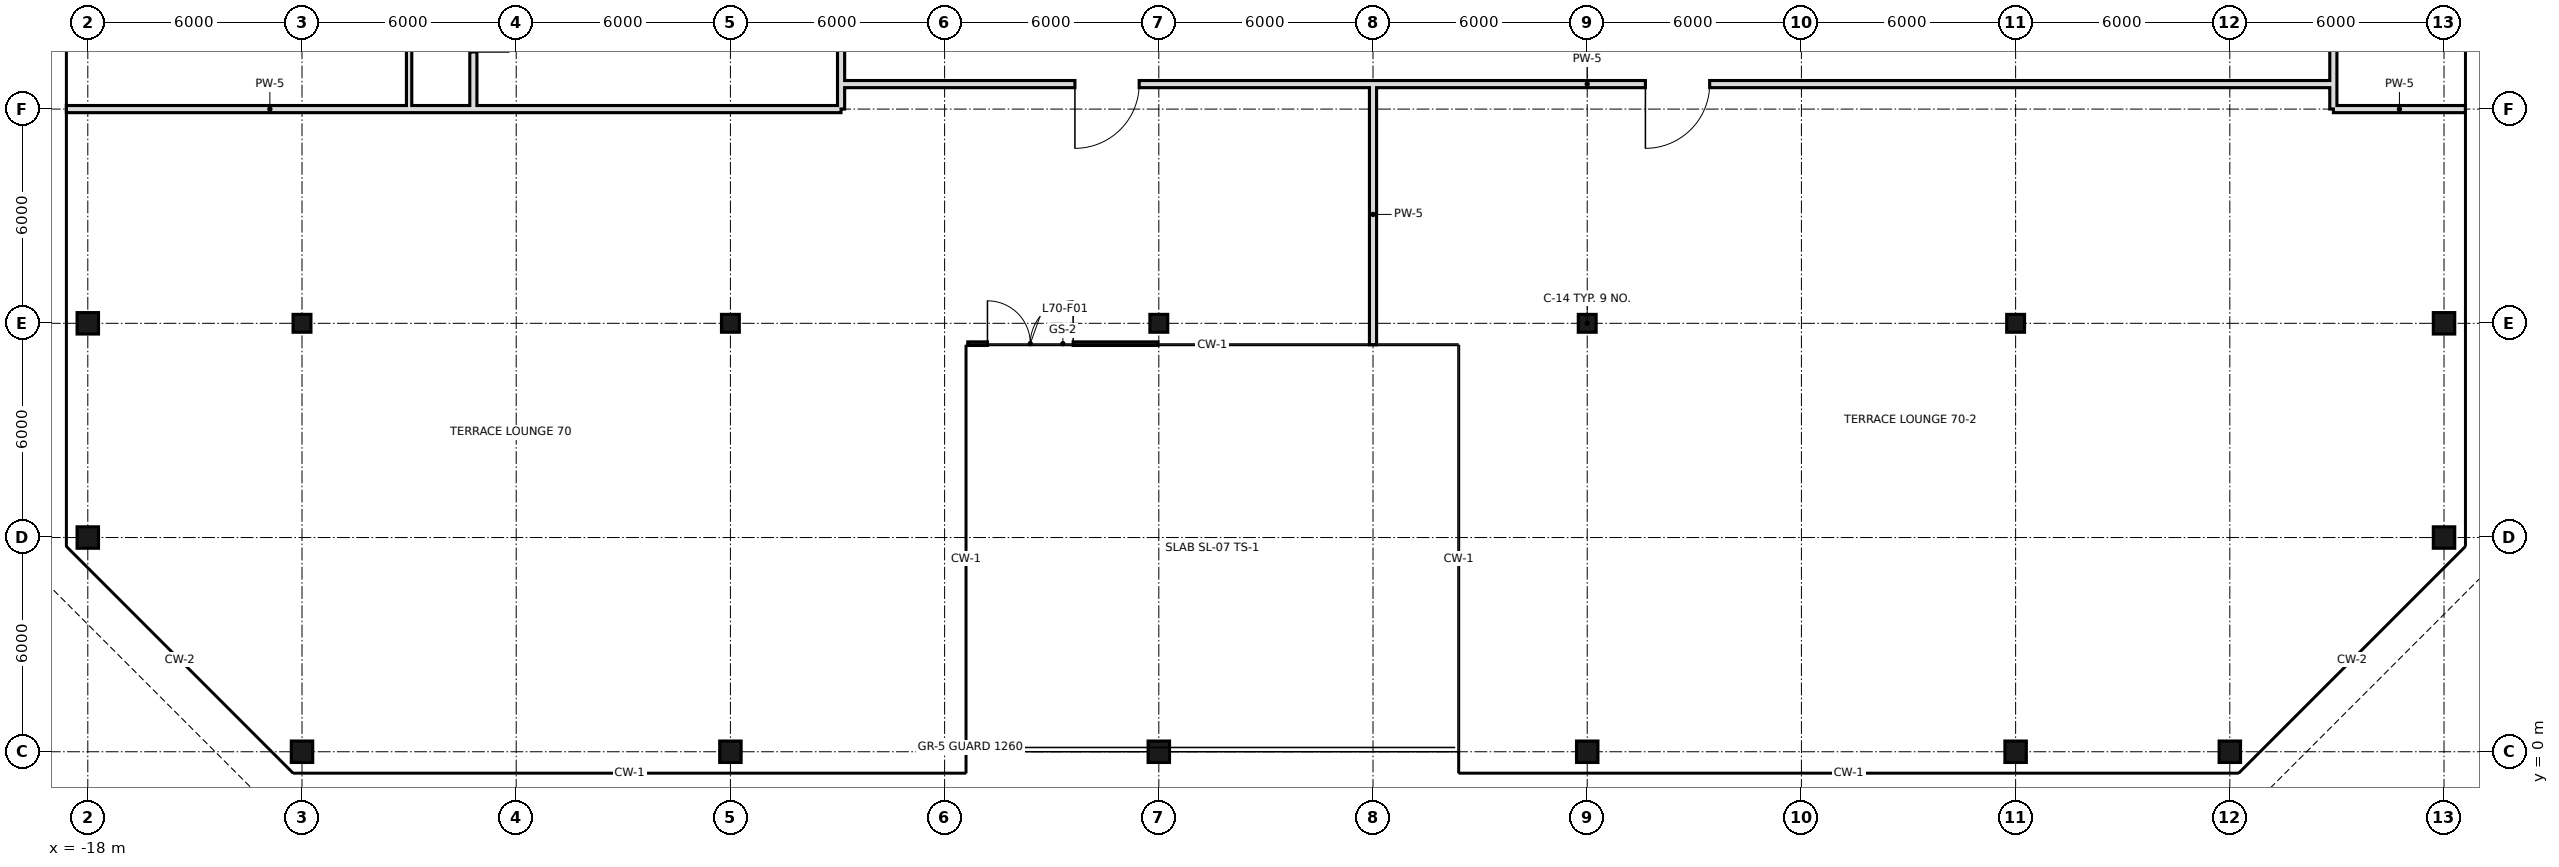
"""IFC4 building model, lengths in metres.
Left out: names, types, materials, properties, quantities, classifications, styles, units other than length and angle.
Written with IfcOpenShell. Run it as: python <this file> out.ifc"""

import sys

from ifc_helpers import new_model, si_unit, direction, frame, frame_2d, origin, origin_with_axes, origin_2d, place, context, subcontext, project, spatial, rectangle, hollow_rectangle, extrude, element, fill, save


model = new_model("IFC4")
c1 = context("Model", 3, precision=1e-05, world=origin(), true_north=direction((0.0, 1.0)))
c2 = subcontext(c1, "Body", "Model", "MODEL_VIEW")
j1 = project(units=[si_unit("LENGTHUNIT", "METRE"), si_unit("PLANEANGLEUNIT", "RADIAN")], contexts=[c1])
p1 = place(None, origin())
s1 = spatial("IfcSite", under=j1, at=p1, CompositionType="ELEMENT")
p2 = place(p1, origin())
s2 = spatial("IfcBuilding", under=s1, at=p2, CompositionType="ELEMENT")
p3 = place(p2, frame((0.0, 0.0, 298.0)))
s3 = spatial("IfcBuildingStorey", under=s2, at=p3, CompositionType="ELEMENT", Elevation=298.0)
for number, where, z_axis, x_axis in (
    (1, (-18.0, 6.0, 0.0), (0.0, 0.0, 1.0), (1.0, 0.0, 0.0)),
    (2, (-18.0, 12.0, 0.0), (0.0, 0.0, 1.0), (1.0, 0.0, 0.0)),
    (3, (-12.0, 0.0, 0.0), (0.0, 0.0, 1.0), (1.0, 0.0, 0.0)),
):
    element("IfcColumn", number, at=place(p3, frame(where, z_axis=z_axis, x_axis=x_axis)), inside=s3, PredefinedType="COLUMN", context=c2, shape_type="SweptSolid", body=[
        extrude(hollow_rectangle(XDim=0.6, YDim=0.6, WallThickness=0.028, at=origin_2d()), origin(), (0.0, 0.0, 1.0), 3.6),
    ])
p4 = place(p3, frame((-12.0, 12.0, 0.0), z_axis=(0.0, 0.0, 1.0), x_axis=(1.0, 0.0, 0.0)))
e4 = element("IfcColumn", 4, at=p4, inside=s3, PredefinedType="COLUMN", context=c2, shape_type="SweptSolid", body=[
    extrude(hollow_rectangle(XDim=0.5, YDim=0.5, WallThickness=0.025, at=origin_2d()), origin(), (0.0, 0.0, 1.0), 3.6),
])
p5 = place(p3, origin_with_axes())
e5 = element("IfcColumn", 5, at=p5, inside=s3, PredefinedType="COLUMN", context=c2, shape_type="SweptSolid", body=[
    extrude(hollow_rectangle(XDim=0.6, YDim=0.6, WallThickness=0.028, at=origin_2d()), origin(), (0.0, 0.0, 1.0), 3.6),
])
p6 = place(p3, frame((0.0, 12.0, 0.0), z_axis=(0.0, 0.0, 1.0), x_axis=(1.0, 0.0, 0.0)))
e6 = element("IfcColumn", 6, at=p6, inside=s3, PredefinedType="COLUMN", context=c2, shape_type="SweptSolid", body=[
    extrude(hollow_rectangle(XDim=0.5, YDim=0.5, WallThickness=0.025, at=origin_2d()), origin(), (0.0, 0.0, 1.0), 3.6),
])
p7 = place(p3, frame((12.0, 0.0, 0.0), z_axis=(0.0, 0.0, 1.0), x_axis=(1.0, 0.0, 0.0)))
e7 = element("IfcColumn", 7, at=p7, inside=s3, PredefinedType="COLUMN", context=c2, shape_type="SweptSolid", body=[
    extrude(hollow_rectangle(XDim=0.6, YDim=0.6, WallThickness=0.028, at=origin_2d()), origin(), (0.0, 0.0, 1.0), 3.6),
])
p8 = place(p3, frame((12.0, 12.0, 0.0), z_axis=(0.0, 0.0, 1.0), x_axis=(1.0, 0.0, 0.0)))
e8 = element("IfcColumn", 8, at=p8, inside=s3, PredefinedType="COLUMN", context=c2, shape_type="SweptSolid", body=[
    extrude(hollow_rectangle(XDim=0.5, YDim=0.5, WallThickness=0.025, at=origin_2d()), origin(), (0.0, 0.0, 1.0), 3.6),
])
p9 = place(p3, frame((24.0, 0.0, 0.0), z_axis=(0.0, 0.0, 1.0), x_axis=(1.0, 0.0, 0.0)))
e9 = element("IfcColumn", 9, at=p9, inside=s3, PredefinedType="COLUMN", context=c2, shape_type="SweptSolid", body=[
    extrude(hollow_rectangle(XDim=0.6, YDim=0.6, WallThickness=0.028, at=origin_2d()), origin(), (0.0, 0.0, 1.0), 3.6),
])
p10 = place(p3, frame((24.0, 12.0, 0.0), z_axis=(0.0, 0.0, 1.0), x_axis=(1.0, 0.0, 0.0)))
e10 = element("IfcColumn", 10, at=p10, inside=s3, PredefinedType="COLUMN", context=c2, shape_type="SweptSolid", body=[
    extrude(hollow_rectangle(XDim=0.5, YDim=0.5, WallThickness=0.025, at=origin_2d()), origin(), (0.0, 0.0, 1.0), 3.6),
])
p11 = place(p3, frame((36.0, 0.0, 0.0), z_axis=(0.0, 0.0, 1.0), x_axis=(1.0, 0.0, 0.0)))
e11 = element("IfcColumn", 11, at=p11, inside=s3, PredefinedType="COLUMN", context=c2, shape_type="SweptSolid", body=[
    extrude(hollow_rectangle(XDim=0.6, YDim=0.6, WallThickness=0.028, at=origin_2d()), origin(), (0.0, 0.0, 1.0), 3.6),
])
p12 = place(p3, frame((36.0, 12.0, 0.0), z_axis=(0.0, 0.0, 1.0), x_axis=(1.0, 0.0, 0.0)))
e12 = element("IfcColumn", 12, at=p12, inside=s3, PredefinedType="COLUMN", context=c2, shape_type="SweptSolid", body=[
    extrude(hollow_rectangle(XDim=0.5, YDim=0.5, WallThickness=0.025, at=origin_2d()), origin(), (0.0, 0.0, 1.0), 3.6),
])
for number, where, z_axis, x_axis in (
    (13, (42.0, 0.0, 0.0), (0.0, 0.0, 1.0), (1.0, 0.0, 0.0)),
    (14, (48.0, 6.0, 0.0), (0.0, 0.0, 1.0), (1.0, 0.0, 0.0)),
    (15, (48.0, 12.0, 0.0), (0.0, 0.0, 1.0), (1.0, 0.0, 0.0)),
):
    element("IfcColumn", number, at=place(p3, frame(where, z_axis=z_axis, x_axis=x_axis)), inside=s3, PredefinedType="COLUMN", context=c2, shape_type="SweptSolid", body=[
        extrude(hollow_rectangle(XDim=0.6, YDim=0.6, WallThickness=0.028, at=origin_2d()), origin(), (0.0, 0.0, 1.0), 3.6),
    ])
p13 = place(p3, frame((6.65, 11.43, 0.0), z_axis=(0.0, 0.0, 1.0), x_axis=(1.0, 0.0, 0.0)))
e16 = element("IfcWall", 16, at=p13, inside=s3, PredefinedType="SOLIDWALL", context=c2, shape_type="SweptSolid", body=[
    extrude(rectangle(XDim=5.325, YDim=0.1, at=frame_2d((2.663, 0.0))), origin(), (0.0, 0.0, 1.0), 3.42),
])
p14 = place(p13, frame((0.55, 0.0, 0.0)))
e17 = element("IfcOpeningElement", 17, at=p14, cuts=e16, PredefinedType="OPENING", context=c2, shape_type="SweptSolid", body=[
    extrude(rectangle(XDim=2.4, YDim=2.4, at=frame_2d((1.2, 1.2))), frame((0.0, 0.06, 0.0), z_axis=(0.0, -1.0, 0.0), x_axis=(1.0, 0.0, 0.0)), (0.0, 0.0, 1.0), 0.12),
])
p15 = place(p3, frame((-7.2, 18.0, 0.0), z_axis=(0.0, 0.0, 1.0), x_axis=(0.0, 1.0, 0.0)))
e18 = element("IfcWall", 18, at=p15, inside=s3, PredefinedType="SOLIDWALL", context=c2, shape_type="SweptSolid", body=[
    extrude(rectangle(XDim=4.2, YDim=0.2, at=frame_2d((2.1, 0.0))), origin(), (0.0, 0.0, 1.0), 2.72),
])
p16 = place(p15, frame((1.6, 0.0, 0.0)))
e19 = element("IfcOpeningElement", 19, at=p16, cuts=e18, PredefinedType="OPENING", context=c2, shape_type="SweptSolid", body=[
    extrude(rectangle(XDim=1.0, YDim=2.4, at=frame_2d((0.5, 1.2))), frame((0.0, 0.11, 0.0), z_axis=(0.0, -1.0, 0.0), x_axis=(1.0, 0.0, 0.0)), (0.0, 0.0, 1.0), 0.22),
])
p17 = place(p3, frame((-9.0, 18.0, 0.0), z_axis=(0.0, 0.0, 1.0), x_axis=(0.0, 1.0, 0.0)))
e20 = element("IfcWall", 20, at=p17, inside=s3, PredefinedType="PARTITIONING", context=c2, shape_type="SweptSolid", body=[
    extrude(rectangle(XDim=8.4, YDim=0.15, at=frame_2d((4.2, 0.0))), origin(), (0.0, 0.0, 1.0), 3.42),
])
p18 = place(p17, frame((2.5, 0.0, 0.0)))
e21 = element("IfcOpeningElement", 21, at=p18, cuts=e20, PredefinedType="OPENING", context=c2, shape_type="SweptSolid", body=[
    extrude(rectangle(XDim=1.0, YDim=2.4, at=frame_2d((0.5, 1.2))), frame((0.0, 0.085, 0.0), z_axis=(0.0, -1.0, 0.0), x_axis=(1.0, 0.0, 0.0)), (0.0, 0.0, 1.0), 0.17),
])
p19 = place(p17, frame((6.88, 0.0, 0.0)))
e22 = element("IfcOpeningElement", 22, at=p19, cuts=e20, PredefinedType="OPENING", context=c2, shape_type="SweptSolid", body=[
    extrude(rectangle(XDim=1.0, YDim=2.4, at=frame_2d((0.5, 1.2))), frame((0.0, 0.085, 0.0), z_axis=(0.0, -1.0, 0.0), x_axis=(1.0, 0.0, 0.0)), (0.0, 0.0, 1.0), 0.17),
])
p20 = place(p3, frame((18.0, 11.4, 0.0), z_axis=(0.0, 0.0, 1.0), x_axis=(0.0, 1.0, 0.0)))
e23 = element("IfcWall", 23, at=p20, inside=s3, PredefinedType="SOLIDWALL", context=c2, shape_type="SweptSolid", body=[
    extrude(rectangle(XDim=7.3, YDim=0.2, at=frame_2d((3.65, 0.0))), origin(), (0.0, 0.0, 1.0), 2.72),
])
p21 = place(p3, frame((3.1, 18.002, 0.0), z_axis=(0.0, 0.0, 1.0), x_axis=(0.0, 1.0, 0.0)))
e24 = element("IfcWall", 24, at=p21, inside=s3, PredefinedType="SOLIDWALL", context=c2, shape_type="SweptSolid", body=[
    extrude(rectangle(XDim=4.198, YDim=0.2, at=frame_2d((2.099, 0.0))), origin(), (0.0, 0.0, 1.0), 3.42),
])
p22 = place(p3, frame((44.9, 18.002, 0.0), z_axis=(0.0, 0.0, 1.0), x_axis=(0.0, 1.0, 0.0)))
e25 = element("IfcWall", 25, at=p22, inside=s3, PredefinedType="SOLIDWALL", context=c2, shape_type="SweptSolid", body=[
    extrude(rectangle(XDim=27.947, YDim=0.2, at=frame_2d((13.974, 0.0))), origin(), (0.0, 0.0, 1.0), 2.97),
])
p23 = place(p22, frame((18.24, 0.0, 0.0)))
e26 = element("IfcOpeningElement", 26, at=p23, cuts=e25, PredefinedType="OPENING", context=c2, shape_type="SweptSolid", body=[
    extrude(rectangle(XDim=1.2, YDim=2.4, at=frame_2d((0.6, 1.2))), frame((0.0, 0.11, 0.0), z_axis=(0.0, -1.0, 0.0), x_axis=(1.0, 0.0, 0.0)), (0.0, 0.0, 1.0), 0.22),
])
p24 = place(p3, frame((-18.6, 18.0, 0.0), z_axis=(0.0, 0.0, 1.0), x_axis=(1.0, 0.0, 0.0)))
e27 = element("IfcWall", 27, at=p24, inside=s3, PredefinedType="SOLIDWALL", context=c2, shape_type="SweptSolid", body=[
    extrude(rectangle(XDim=11.4, YDim=0.2, at=frame_2d((5.7, 0.0))), origin(), (0.0, 0.0, 1.0), 2.72),
])
p25 = place(p3, frame((44.902, 18.0, 0.0), z_axis=(0.0, 0.0, 1.0), x_axis=(1.0, 0.0, 0.0)))
e28 = element("IfcWall", 28, at=p25, inside=s3, PredefinedType="SOLIDWALL", context=c2, shape_type="SweptSolid", body=[
    extrude(rectangle(XDim=3.698, YDim=0.2, at=frame_2d((1.849, 0.0))), origin(), (0.0, 0.0, 1.0), 2.72),
])
p26 = place(p3, frame((-7.2, 18.0, 0.0), z_axis=(0.0, 0.0, 1.0), x_axis=(1.0, 0.0, 0.0)))
e29 = element("IfcWall", 29, at=p26, inside=s3, PredefinedType="SOLIDWALL", context=c2, shape_type="SweptSolid", body=[
    extrude(rectangle(XDim=10.298, YDim=0.2, at=frame_2d((5.149, 0.0))), origin(), (0.0, 0.0, 1.0), 2.72),
])
p27 = place(p3, frame((3.1, 18.7, 0.0), z_axis=(0.0, 0.0, 1.0), x_axis=(1.0, 0.0, 0.0)))
e30 = element("IfcWall", 30, at=p27, inside=s3, PredefinedType="SOLIDWALL", context=c2, shape_type="SweptSolid", body=[
    extrude(rectangle(XDim=41.8, YDim=0.2, at=frame_2d((20.9, 0.0))), origin(), (0.0, 0.0, 1.0), 2.72),
])
p28 = place(p27, frame((6.55, 0.0, 0.0)))
e31 = element("IfcOpeningElement", 31, at=p28, cuts=e30, PredefinedType="OPENING", context=c2, shape_type="SweptSolid", body=[
    extrude(rectangle(XDim=1.8, YDim=2.4, at=frame_2d((0.9, 1.2))), frame((0.0, 0.11, 0.0), z_axis=(0.0, -1.0, 0.0), x_axis=(1.0, 0.0, 0.0)), (0.0, 0.0, 1.0), 0.22),
])
p29 = place(p27, frame((22.53, 0.0, 0.0)))
e32 = element("IfcOpeningElement", 32, at=p29, cuts=e30, PredefinedType="OPENING", context=c2, shape_type="SweptSolid", body=[
    extrude(rectangle(XDim=1.8, YDim=2.4, at=frame_2d((0.9, 1.2))), frame((0.0, 0.11, 0.0), z_axis=(0.0, -1.0, 0.0), x_axis=(1.0, 0.0, 0.0)), (0.0, 0.0, 1.0), 0.22),
])
p30 = place(p14, origin())
e33 = element("IfcDoor", 33, at=p30, inside=s3, OperationType="DOUBLE_DOOR_SINGLE_SWING", PredefinedType="DOOR", context=c2, shape_type="SweptSolid", body=[
    extrude(rectangle(XDim=2.4, YDim=2.4, at=frame_2d((1.2, 1.2))), frame((0.0, 0.025, 0.0), z_axis=(0.0, -1.0, 0.0), x_axis=(1.0, 0.0, 0.0)), (0.0, 0.0, 1.0), 0.05),
])
fill(e17, e33)
p31 = place(p28, frame((1.8, 0.0, 0.0), z_axis=(0.0, 0.0, 1.0), x_axis=(-1.0, 0.0, 0.0)))
e34 = element("IfcDoor", 34, at=p31, inside=s3, OperationType="SINGLE_SWING_RIGHT", PredefinedType="DOOR", context=c2, shape_type="SweptSolid", body=[
    extrude(rectangle(XDim=1.8, YDim=2.4, at=frame_2d((0.9, 1.2))), frame((0.0, 0.025, 0.0), z_axis=(0.0, -1.0, 0.0), x_axis=(1.0, 0.0, 0.0)), (0.0, 0.0, 1.0), 0.05),
])
fill(e31, e34)
p32 = place(p29, frame((1.8, 0.0, 0.0), z_axis=(0.0, 0.0, 1.0), x_axis=(-1.0, 0.0, 0.0)))
e35 = element("IfcDoor", 35, at=p32, inside=s3, OperationType="SINGLE_SWING_RIGHT", PredefinedType="DOOR", context=c2, shape_type="SweptSolid", body=[
    extrude(rectangle(XDim=1.8, YDim=2.4, at=frame_2d((0.9, 1.2))), frame((0.0, 0.025, 0.0), z_axis=(0.0, -1.0, 0.0), x_axis=(1.0, 0.0, 0.0)), (0.0, 0.0, 1.0), 0.05),
])
fill(e32, e35)
save(model, sys.argv[1])
